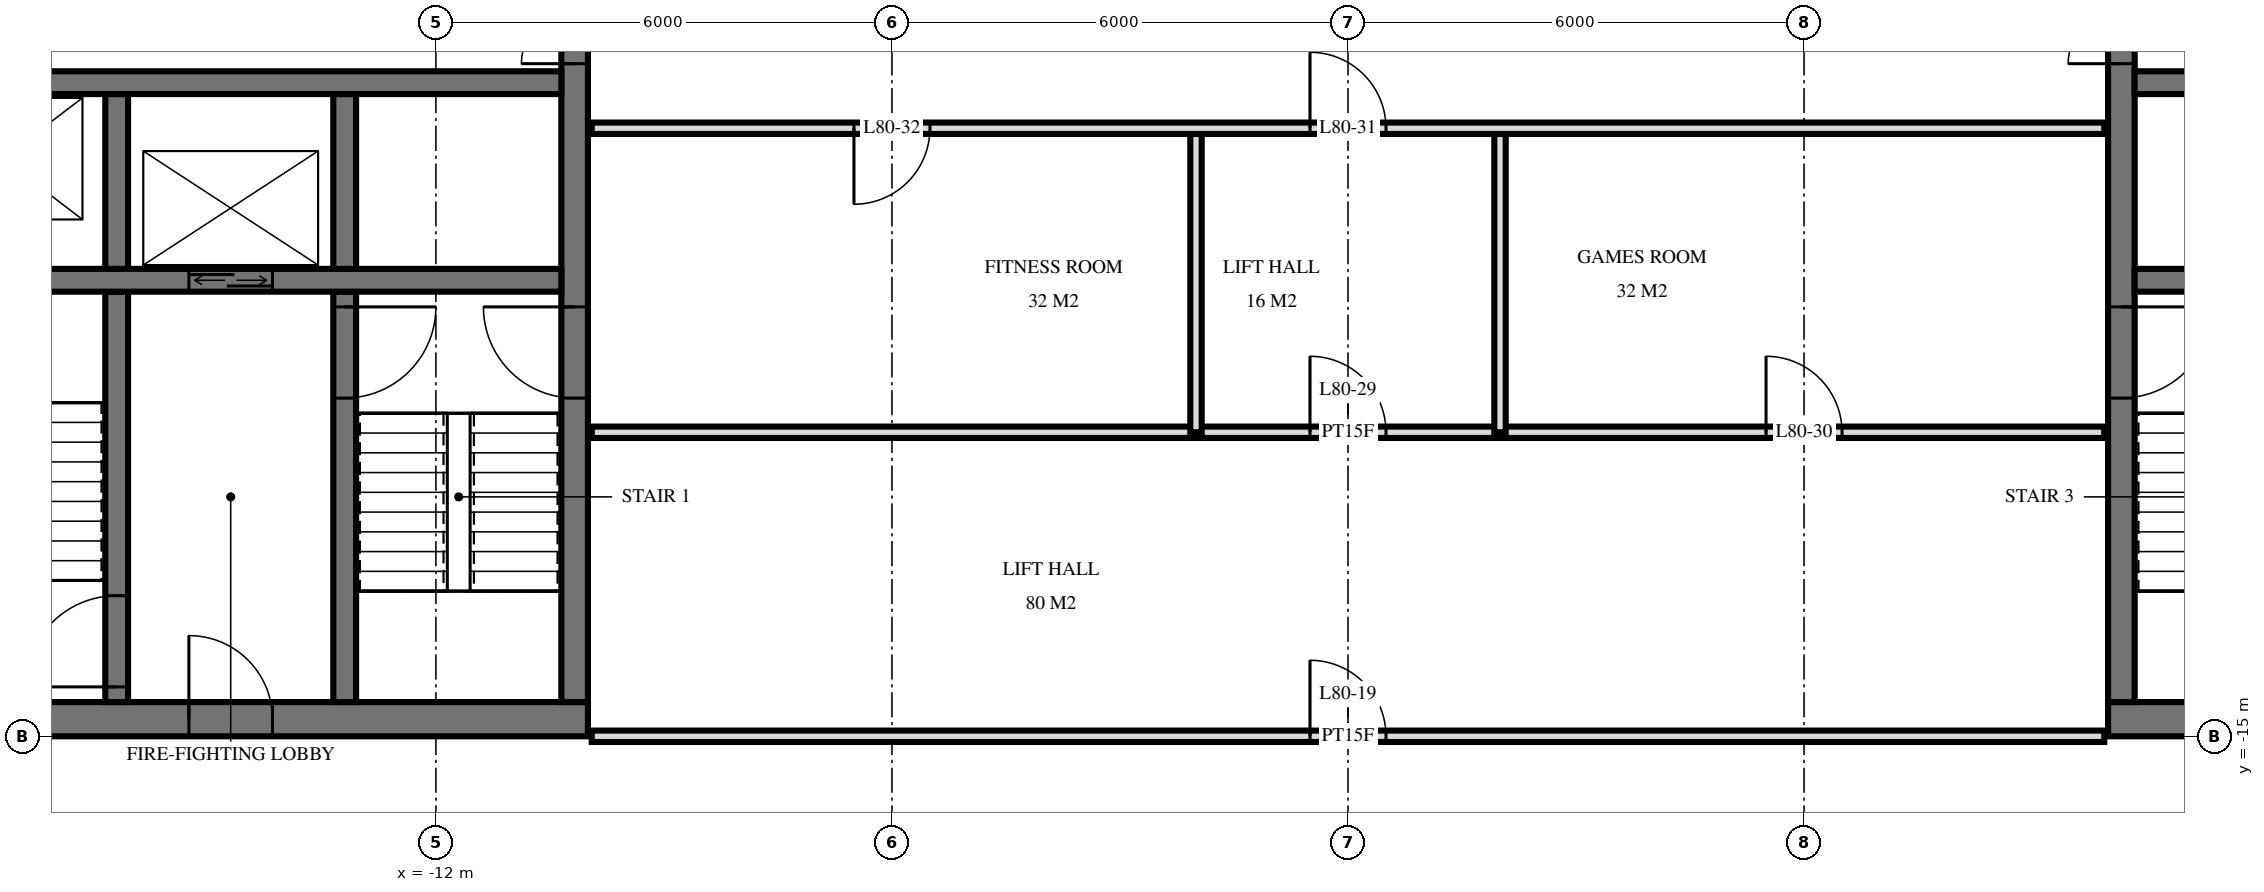
"""IFC4 building model, lengths in metres.
Left out: names, types, materials, properties, quantities, classifications, styles, units other than length and angle.
Written with IfcOpenShell. Run it as: python <this file> out.ifc"""

import sys

from ifc_helpers import new_model, si_unit, direction, frame, frame_2d, origin, place, context, subcontext, project, spatial, rectangle, extrude, element, fill, save


model = new_model("IFC4")
c1 = context("Model", 3, precision=1e-05, world=origin(), true_north=direction((0.0, 1.0)))
c2 = subcontext(c1, "Body", "Model", "MODEL_VIEW")
j1 = project(units=[si_unit("LENGTHUNIT", "METRE"), si_unit("PLANEANGLEUNIT", "RADIAN")], contexts=[c1])
p1 = place(None, origin())
s1 = spatial("IfcSite", under=j1, at=p1, CompositionType="ELEMENT")
p2 = place(p1, origin())
s2 = spatial("IfcBuilding", under=s1, at=p2, CompositionType="ELEMENT")
p3 = place(p2, frame((0.0, 0.0, 301.6)))
s3 = spatial("IfcBuildingStorey", under=s2, at=p3, CompositionType="ELEMENT", Elevation=301.6)
p4 = place(p3, frame((-19.5, -14.775, 0.0), z_axis=(0.0, 0.0, 1.0), x_axis=(1.0, 0.0, 0.0)))
e1 = element("IfcWall", 1, at=p4, inside=s3, PredefinedType="SHEAR", context=c2, shape_type="SweptSolid", body=[
    extrude(rectangle(XDim=9.5, YDim=0.45, at=frame_2d((4.75, 0.0))), origin(), (0.0, 0.0, 1.0), 3.5),
])
p5 = place(p4, frame((1.2, 0.0, 0.0)))
e2 = element("IfcOpeningElement", 2, at=p5, cuts=e1, PredefinedType="OPENING", context=c2, shape_type="SweptSolid", body=[
    extrude(rectangle(XDim=1.2, YDim=2.1, at=frame_2d((0.6, 1.05))), frame((0.0, 0.235, 0.0), z_axis=(0.0, -1.0, 0.0), x_axis=(1.0, 0.0, 0.0)), (0.0, 0.0, 1.0), 0.47),
])
p6 = place(p4, frame((4.25, 0.0, 0.0)))
e3 = element("IfcOpeningElement", 3, at=p6, cuts=e1, PredefinedType="OPENING", context=c2, shape_type="SweptSolid", body=[
    extrude(rectangle(XDim=1.1, YDim=2.1, at=frame_2d((0.55, 1.05))), frame((0.0, 0.235, 0.0), z_axis=(0.0, -1.0, 0.0), x_axis=(1.0, 0.0, 0.0)), (0.0, 0.0, 1.0), 0.47),
])
p7 = place(p3, frame((-10.175, -14.55, 0.0), z_axis=(0.0, 0.0, 1.0), x_axis=(0.0, 1.0, 0.0)))
e4 = element("IfcWall", 4, at=p7, inside=s3, PredefinedType="SHEAR", context=c2, shape_type="SweptSolid", body=[
    extrude(rectangle(XDim=14.1, YDim=0.35, at=frame_2d((7.05, 0.0))), origin(), (0.0, 0.0, 1.0), 3.5),
])
p8 = place(p7, frame((8.4, 0.0, 0.0)))
e5 = element("IfcOpeningElement", 5, at=p8, cuts=e4, PredefinedType="OPENING", context=c2, shape_type="SweptSolid", body=[
    extrude(rectangle(XDim=1.4, YDim=2.4, at=frame_2d((0.7, 1.2))), frame((0.0, 0.185, 0.0), z_axis=(0.0, -1.0, 0.0), x_axis=(1.0, 0.0, 0.0)), (0.0, 0.0, 1.0), 0.37),
])
p9 = place(p7, frame((10.0, 0.0, 0.0)))
e6 = element("IfcOpeningElement", 6, at=p9, cuts=e4, PredefinedType="OPENING", context=c2, shape_type="SweptSolid", body=[
    extrude(rectangle(XDim=1.4, YDim=2.4, at=frame_2d((0.7, 1.2))), frame((0.0, 0.185, 0.0), z_axis=(0.0, -1.0, 0.0), x_axis=(1.0, 0.0, 0.0)), (0.0, 0.0, 1.0), 0.37),
])
p10 = place(p7, frame((4.0, 0.0, 0.0)))
e7 = element("IfcOpeningElement", 7, at=p10, cuts=e4, PredefinedType="OPENING", context=c2, shape_type="SweptSolid", body=[
    extrude(rectangle(XDim=1.2, YDim=2.1, at=frame_2d((0.6, 1.05))), frame((0.0, 0.185, 0.0), z_axis=(0.0, -1.0, 0.0), x_axis=(1.0, 0.0, 0.0)), (0.0, 0.0, 1.0), 0.37),
])
p11 = place(p3, frame((-19.05, -6.4, 0.0), z_axis=(0.0, 0.0, 1.0), x_axis=(1.0, 0.0, 0.0)))
e8 = element("IfcWall", 8, at=p11, inside=s3, PredefinedType="SHEAR", context=c2, shape_type="SweptSolid", body=[
    extrude(rectangle(XDim=8.7, YDim=0.3, at=frame_2d((4.35, 0.0))), origin(), (0.0, 0.0, 1.0), 3.5),
])
p12 = place(p11, frame((0.8, 0.0, 0.0)))
e9 = element("IfcOpeningElement", 9, at=p12, cuts=e8, PredefinedType="OPENING", context=c2, shape_type="SweptSolid", body=[
    extrude(rectangle(XDim=1.1, YDim=2.1, at=frame_2d((0.55, 1.05))), frame((0.0, 0.16, 0.0), z_axis=(0.0, -1.0, 0.0), x_axis=(1.0, 0.0, 0.0)), (0.0, 0.0, 1.0), 0.32),
])
p13 = place(p3, frame((-19.05, -9.0, 0.0), z_axis=(0.0, 0.0, 1.0), x_axis=(1.0, 0.0, 0.0)))
e10 = element("IfcWall", 10, at=p13, inside=s3, PredefinedType="SHEAR", context=c2, shape_type="SweptSolid", body=[
    extrude(rectangle(XDim=8.7, YDim=0.3, at=frame_2d((4.35, 0.0))), origin(), (0.0, 0.0, 1.0), 3.5),
])
p14 = place(p13, frame((3.8, 0.0, 0.0)))
e11 = element("IfcOpeningElement", 11, at=p14, cuts=e10, PredefinedType="OPENING", context=c2, shape_type="SweptSolid", body=[
    extrude(rectangle(XDim=1.1, YDim=2.1, at=frame_2d((0.55, 1.05))), frame((0.0, 0.16, 0.0), z_axis=(0.0, -1.0, 0.0), x_axis=(1.0, 0.0, 0.0)), (0.0, 0.0, 1.0), 0.32),
])
p15 = place(p3, frame((-13.2, -8.85, 0.0), z_axis=(0.0, 0.0, 1.0), x_axis=(0.0, 1.0, 0.0)))
e12 = element("IfcWall", 12, at=p15, inside=s3, PredefinedType="SHEAR", context=c2, shape_type="SweptSolid", body=[
    extrude(rectangle(XDim=2.3, YDim=0.3, at=frame_2d((1.15, 0.0))), origin(), (0.0, 0.0, 1.0), 3.5),
])
p16 = place(p3, frame((-13.2, -14.55, 0.0), z_axis=(0.0, 0.0, 1.0), x_axis=(0.0, 1.0, 0.0)))
e13 = element("IfcWall", 13, at=p16, inside=s3, PredefinedType="SHEAR", context=c2, shape_type="SweptSolid", body=[
    extrude(rectangle(XDim=5.4, YDim=0.3, at=frame_2d((2.7, 0.0))), origin(), (0.0, 0.0, 1.0), 3.5),
])
p17 = place(p16, frame((4.0, 0.0, 0.0)))
e14 = element("IfcOpeningElement", 14, at=p17, cuts=e13, PredefinedType="OPENING", context=c2, shape_type="SweptSolid", body=[
    extrude(rectangle(XDim=1.2, YDim=2.1, at=frame_2d((0.6, 1.05))), frame((0.0, 0.16, 0.0), z_axis=(0.0, -1.0, 0.0), x_axis=(1.0, 0.0, 0.0)), (0.0, 0.0, 1.0), 0.32),
])
p18 = place(p3, frame((-16.2, -8.85, 0.0), z_axis=(0.0, 0.0, 1.0), x_axis=(0.0, 1.0, 0.0)))
e15 = element("IfcWall", 15, at=p18, inside=s3, PredefinedType="SHEAR", context=c2, shape_type="SweptSolid", body=[
    extrude(rectangle(XDim=2.3, YDim=0.3, at=frame_2d((1.15, 0.0))), origin(), (0.0, 0.0, 1.0), 3.5),
])
p19 = place(p3, frame((-16.2, -14.55, 0.0), z_axis=(0.0, 0.0, 1.0), x_axis=(0.0, 1.0, 0.0)))
e16 = element("IfcWall", 16, at=p19, inside=s3, PredefinedType="SHEAR", context=c2, shape_type="SweptSolid", body=[
    extrude(rectangle(XDim=5.4, YDim=0.3, at=frame_2d((2.7, 0.0))), origin(), (0.0, 0.0, 1.0), 3.5),
])
p20 = place(p19, frame((0.2, 0.0, 0.0)))
e17 = element("IfcOpeningElement", 17, at=p20, cuts=e16, PredefinedType="OPENING", context=c2, shape_type="SweptSolid", body=[
    extrude(rectangle(XDim=1.2, YDim=2.1, at=frame_2d((0.6, 1.05))), frame((0.0, 0.16, 0.0), z_axis=(0.0, -1.0, 0.0), x_axis=(1.0, 0.0, 0.0)), (0.0, 0.0, 1.0), 0.32),
])
p21 = place(p3, frame((10.0, -14.775, 0.0), z_axis=(0.0, 0.0, 1.0), x_axis=(1.0, 0.0, 0.0)))
e18 = element("IfcWall", 18, at=p21, inside=s3, PredefinedType="SHEAR", context=c2, shape_type="SweptSolid", body=[
    extrude(rectangle(XDim=9.5, YDim=0.45, at=frame_2d((4.75, 0.0))), origin(), (0.0, 0.0, 1.0), 3.5),
])
p22 = place(p21, frame((7.1, 0.0, 0.0)))
e19 = element("IfcOpeningElement", 19, at=p22, cuts=e18, PredefinedType="OPENING", context=c2, shape_type="SweptSolid", body=[
    extrude(rectangle(XDim=1.2, YDim=2.1, at=frame_2d((0.6, 1.05))), frame((0.0, 0.235, 0.0), z_axis=(0.0, -1.0, 0.0), x_axis=(1.0, 0.0, 0.0)), (0.0, 0.0, 1.0), 0.47),
])
p23 = place(p21, frame((4.15, 0.0, 0.0)))
e20 = element("IfcOpeningElement", 20, at=p23, cuts=e18, PredefinedType="OPENING", context=c2, shape_type="SweptSolid", body=[
    extrude(rectangle(XDim=1.1, YDim=2.1, at=frame_2d((0.55, 1.05))), frame((0.0, 0.235, 0.0), z_axis=(0.0, -1.0, 0.0), x_axis=(1.0, 0.0, 0.0)), (0.0, 0.0, 1.0), 0.47),
])
p24 = place(p3, frame((10.175, -14.55, 0.0), z_axis=(0.0, 0.0, 1.0), x_axis=(0.0, 1.0, 0.0)))
e21 = element("IfcWall", 21, at=p24, inside=s3, PredefinedType="SHEAR", context=c2, shape_type="SweptSolid", body=[
    extrude(rectangle(XDim=14.1, YDim=0.35, at=frame_2d((7.05, 0.0))), origin(), (0.0, 0.0, 1.0), 3.5),
])
p25 = place(p24, frame((8.4, 0.0, 0.0)))
e22 = element("IfcOpeningElement", 22, at=p25, cuts=e21, PredefinedType="OPENING", context=c2, shape_type="SweptSolid", body=[
    extrude(rectangle(XDim=1.4, YDim=2.4, at=frame_2d((0.7, 1.2))), frame((0.0, 0.185, 0.0), z_axis=(0.0, -1.0, 0.0), x_axis=(1.0, 0.0, 0.0)), (0.0, 0.0, 1.0), 0.37),
])
p26 = place(p24, frame((10.0, 0.0, 0.0)))
e23 = element("IfcOpeningElement", 23, at=p26, cuts=e21, PredefinedType="OPENING", context=c2, shape_type="SweptSolid", body=[
    extrude(rectangle(XDim=1.4, YDim=2.4, at=frame_2d((0.7, 1.2))), frame((0.0, 0.185, 0.0), z_axis=(0.0, -1.0, 0.0), x_axis=(1.0, 0.0, 0.0)), (0.0, 0.0, 1.0), 0.37),
])
p27 = place(p24, frame((4.0, 0.0, 0.0)))
e24 = element("IfcOpeningElement", 24, at=p27, cuts=e21, PredefinedType="OPENING", context=c2, shape_type="SweptSolid", body=[
    extrude(rectangle(XDim=1.2, YDim=2.1, at=frame_2d((0.6, 1.05))), frame((0.0, 0.185, 0.0), z_axis=(0.0, -1.0, 0.0), x_axis=(1.0, 0.0, 0.0)), (0.0, 0.0, 1.0), 0.37),
])
p28 = place(p3, frame((10.35, -6.4, 0.0), z_axis=(0.0, 0.0, 1.0), x_axis=(1.0, 0.0, 0.0)))
e25 = element("IfcWall", 25, at=p28, inside=s3, PredefinedType="SHEAR", context=c2, shape_type="SweptSolid", body=[
    extrude(rectangle(XDim=8.7, YDim=0.3, at=frame_2d((4.35, 0.0))), origin(), (0.0, 0.0, 1.0), 3.5),
])
p29 = place(p28, frame((6.8, 0.0, 0.0)))
e26 = element("IfcOpeningElement", 26, at=p29, cuts=e25, PredefinedType="OPENING", context=c2, shape_type="SweptSolid", body=[
    extrude(rectangle(XDim=1.1, YDim=2.1, at=frame_2d((0.55, 1.05))), frame((0.0, 0.16, 0.0), z_axis=(0.0, -1.0, 0.0), x_axis=(1.0, 0.0, 0.0)), (0.0, 0.0, 1.0), 0.32),
])
p30 = place(p3, frame((10.35, -9.0, 0.0), z_axis=(0.0, 0.0, 1.0), x_axis=(1.0, 0.0, 0.0)))
e27 = element("IfcWall", 27, at=p30, inside=s3, PredefinedType="SHEAR", context=c2, shape_type="SweptSolid", body=[
    extrude(rectangle(XDim=8.7, YDim=0.3, at=frame_2d((4.35, 0.0))), origin(), (0.0, 0.0, 1.0), 3.5),
])
p31 = place(p30, frame((3.8, 0.0, 0.0)))
e28 = element("IfcOpeningElement", 28, at=p31, cuts=e27, PredefinedType="OPENING", context=c2, shape_type="SweptSolid", body=[
    extrude(rectangle(XDim=1.1, YDim=2.1, at=frame_2d((0.55, 1.05))), frame((0.0, 0.16, 0.0), z_axis=(0.0, -1.0, 0.0), x_axis=(1.0, 0.0, 0.0)), (0.0, 0.0, 1.0), 0.32),
])
for number, where, z_axis, x_axis in (
    (29, (2.0, -11.0, 0.0), (0.0, 0.0, 1.0), (0.0, 1.0, 0.0)),
    (30, (-2.0, -11.0, 0.0), (0.0, 0.0, 1.0), (0.0, 1.0, 0.0)),
):
    element("IfcWall", number, at=place(p3, frame(where, z_axis=z_axis, x_axis=x_axis)), inside=s3, PredefinedType="PARTITIONING", context=c2, shape_type="SweptSolid", body=[
        extrude(rectangle(XDim=4.0, YDim=0.15, at=frame_2d((2.0, 0.0))), origin(), (0.0, 0.0, 1.0), 3.22),
    ])
p32 = place(p3, frame((-9.95, -15.0, 0.0), z_axis=(0.0, 0.0, 1.0), x_axis=(1.0, 0.0, 0.0)))
e31 = element("IfcWall", 31, at=p32, inside=s3, PredefinedType="PARTITIONING", context=c2, shape_type="SweptSolid", body=[
    extrude(rectangle(XDim=19.9, YDim=0.15, at=frame_2d((9.95, 0.0))), origin(), (0.0, 0.0, 1.0), 2.584),
])
p33 = place(p32, frame((9.45, 0.0, 0.0)))
e32 = element("IfcOpeningElement", 32, at=p33, cuts=e31, PredefinedType="OPENING", context=c2, shape_type="SweptSolid", body=[
    extrude(rectangle(XDim=1.0, YDim=2.1, at=frame_2d((0.5, 1.05))), frame((0.0, 0.085, 0.0), z_axis=(0.0, -1.0, 0.0), x_axis=(1.0, 0.0, 0.0)), (0.0, 0.0, 1.0), 0.17),
])
p34 = place(p3, frame((-9.95, -11.0, 0.0), z_axis=(0.0, 0.0, 1.0), x_axis=(1.0, 0.0, 0.0)))
e33 = element("IfcWall", 33, at=p34, inside=s3, PredefinedType="PARTITIONING", context=c2, shape_type="SweptSolid", body=[
    extrude(rectangle(XDim=19.9, YDim=0.15, at=frame_2d((9.95, 0.0))), origin(), (0.0, 0.0, 1.0), 3.22),
])
p35 = place(p34, frame((9.45, 0.0, 0.0)))
e34 = element("IfcOpeningElement", 34, at=p35, cuts=e33, PredefinedType="OPENING", context=c2, shape_type="SweptSolid", body=[
    extrude(rectangle(XDim=1.0, YDim=2.1, at=frame_2d((0.5, 1.05))), frame((0.0, 0.085, 0.0), z_axis=(0.0, -1.0, 0.0), x_axis=(1.0, 0.0, 0.0)), (0.0, 0.0, 1.0), 0.17),
])
p36 = place(p34, frame((15.45, 0.0, 0.0)))
e35 = element("IfcOpeningElement", 35, at=p36, cuts=e33, PredefinedType="OPENING", context=c2, shape_type="SweptSolid", body=[
    extrude(rectangle(XDim=1.0, YDim=2.1, at=frame_2d((0.5, 1.05))), frame((0.0, 0.085, 0.0), z_axis=(0.0, -1.0, 0.0), x_axis=(1.0, 0.0, 0.0)), (0.0, 0.0, 1.0), 0.17),
])
p37 = place(p3, frame((-9.95, -7.0, 0.0), z_axis=(0.0, 0.0, 1.0), x_axis=(1.0, 0.0, 0.0)))
e36 = element("IfcWall", 36, at=p37, inside=s3, PredefinedType="PARTITIONING", context=c2, shape_type="SweptSolid", body=[
    extrude(rectangle(XDim=19.9, YDim=0.15, at=frame_2d((9.95, 0.0))), origin(), (0.0, 0.0, 1.0), 3.22),
])
p38 = place(p37, frame((9.45, 0.0, 0.0)))
e37 = element("IfcOpeningElement", 37, at=p38, cuts=e36, PredefinedType="OPENING", context=c2, shape_type="SweptSolid", body=[
    extrude(rectangle(XDim=1.0, YDim=2.1, at=frame_2d((0.5, 1.05))), frame((0.0, 0.085, 0.0), z_axis=(0.0, -1.0, 0.0), x_axis=(1.0, 0.0, 0.0)), (0.0, 0.0, 1.0), 0.17),
])
p39 = place(p37, frame((3.45, 0.0, 0.0)))
e38 = element("IfcOpeningElement", 38, at=p39, cuts=e36, PredefinedType="OPENING", context=c2, shape_type="SweptSolid", body=[
    extrude(rectangle(XDim=1.0, YDim=2.1, at=frame_2d((0.5, 1.05))), frame((0.0, 0.085, 0.0), z_axis=(0.0, -1.0, 0.0), x_axis=(1.0, 0.0, 0.0)), (0.0, 0.0, 1.0), 0.17),
])
p40 = place(p14, origin())
e39 = element("IfcDoor", 39, at=p40, inside=s3, OperationType="DOUBLE_DOOR_SLIDING", PredefinedType="USERDEFINED", context=c2, shape_type="SweptSolid", body=[
    extrude(rectangle(XDim=1.1, YDim=2.1, at=frame_2d((0.55, 1.05))), frame((0.0, 0.025, 0.0), z_axis=(0.0, -1.0, 0.0), x_axis=(1.0, 0.0, 0.0)), (0.0, 0.0, 1.0), 0.05),
])
fill(e11, e39)
p41 = place(p8, origin())
e40 = element("IfcDoor", 40, at=p41, inside=s3, OperationType="DOUBLE_DOOR_SINGLE_SWING", PredefinedType="DOOR", context=c2, shape_type="SweptSolid", body=[
    extrude(rectangle(XDim=1.4, YDim=2.4, at=frame_2d((0.7, 1.2))), frame((0.0, 0.025, 0.0), z_axis=(0.0, -1.0, 0.0), x_axis=(1.0, 0.0, 0.0)), (0.0, 0.0, 1.0), 0.05),
])
fill(e5, e40)
p42 = place(p10, origin())
e41 = element("IfcDoor", 41, at=p42, inside=s3, OperationType="SINGLE_SWING_LEFT", PredefinedType="DOOR", context=c2, shape_type="SweptSolid", body=[
    extrude(rectangle(XDim=1.2, YDim=2.1, at=frame_2d((0.6, 1.05))), frame((0.0, 0.025, 0.0), z_axis=(0.0, -1.0, 0.0), x_axis=(1.0, 0.0, 0.0)), (0.0, 0.0, 1.0), 0.05),
])
fill(e7, e41)
p43 = place(p6, origin())
e42 = element("IfcDoor", 42, at=p43, inside=s3, OperationType="SINGLE_SWING_RIGHT", PredefinedType="DOOR", context=c2, shape_type="SweptSolid", body=[
    extrude(rectangle(XDim=1.1, YDim=2.1, at=frame_2d((0.55, 1.05))), frame((0.0, 0.025, 0.0), z_axis=(0.0, -1.0, 0.0), x_axis=(1.0, 0.0, 0.0)), (0.0, 0.0, 1.0), 0.05),
])
fill(e3, e42)
p44 = place(p17, frame((0.6, 0.0, 0.0), z_axis=(0.0, 0.0, 1.0), x_axis=(-1.0, 0.0, 0.0)))
e43 = element("IfcDoor", 43, at=p44, inside=s3, OperationType="SINGLE_SWING_RIGHT", PredefinedType="DOOR", context=c2, shape_type="SweptSolid", body=[
    extrude(rectangle(XDim=1.2, YDim=2.1, at=frame_2d((0.0, 1.05))), frame((0.0, -0.025, 0.0), z_axis=(0.0, 1.0, 0.0), x_axis=(-1.0, 0.0, 0.0)), (0.0, 0.0, 1.0), 0.05),
])
fill(e14, e43)
p45 = place(p20, origin())
e44 = element("IfcDoor", 44, at=p45, inside=s3, OperationType="SINGLE_SWING_RIGHT", PredefinedType="DOOR", context=c2, shape_type="SweptSolid", body=[
    extrude(rectangle(XDim=1.2, YDim=2.1, at=frame_2d((0.6, 1.05))), frame((0.0, 0.025, 0.0), z_axis=(0.0, -1.0, 0.0), x_axis=(1.0, 0.0, 0.0)), (0.0, 0.0, 1.0), 0.05),
])
fill(e17, e44)
p46 = place(p25, origin())
e45 = element("IfcDoor", 45, at=p46, inside=s3, OperationType="DOUBLE_DOOR_SINGLE_SWING", PredefinedType="DOOR", context=c2, shape_type="SweptSolid", body=[
    extrude(rectangle(XDim=1.4, YDim=2.4, at=frame_2d((0.7, 1.2))), frame((0.0, 0.025, 0.0), z_axis=(0.0, -1.0, 0.0), x_axis=(1.0, 0.0, 0.0)), (0.0, 0.0, 1.0), 0.05),
])
fill(e22, e45)
p47 = place(p27, frame((0.6, 0.0, 0.0), z_axis=(0.0, 0.0, 1.0), x_axis=(-1.0, 0.0, 0.0)))
e46 = element("IfcDoor", 46, at=p47, inside=s3, OperationType="SINGLE_SWING_RIGHT", PredefinedType="DOOR", context=c2, shape_type="SweptSolid", body=[
    extrude(rectangle(XDim=1.2, YDim=2.1, at=frame_2d((0.0, 1.05))), frame((0.0, -0.025, 0.0), z_axis=(0.0, 1.0, 0.0), x_axis=(-1.0, 0.0, 0.0)), (0.0, 0.0, 1.0), 0.05),
])
fill(e24, e46)
p48 = place(p33, origin())
e47 = element("IfcDoor", 47, at=p48, inside=s3, OperationType="SINGLE_SWING_RIGHT", PredefinedType="DOOR", context=c2, shape_type="SweptSolid", body=[
    extrude(rectangle(XDim=1.0, YDim=2.1, at=frame_2d((0.5, 1.05))), frame((0.0, 0.025, 0.0), z_axis=(0.0, -1.0, 0.0), x_axis=(1.0, 0.0, 0.0)), (0.0, 0.0, 1.0), 0.05),
])
fill(e32, e47)
p49 = place(p35, origin())
e48 = element("IfcDoor", 48, at=p49, inside=s3, OperationType="SINGLE_SWING_RIGHT", PredefinedType="DOOR", context=c2, shape_type="SweptSolid", body=[
    extrude(rectangle(XDim=1.0, YDim=2.1, at=frame_2d((0.5, 1.05))), frame((0.0, 0.025, 0.0), z_axis=(0.0, -1.0, 0.0), x_axis=(1.0, 0.0, 0.0)), (0.0, 0.0, 1.0), 0.05),
])
fill(e34, e48)
p50 = place(p36, origin())
e49 = element("IfcDoor", 49, at=p50, inside=s3, OperationType="SINGLE_SWING_RIGHT", PredefinedType="DOOR", context=c2, shape_type="SweptSolid", body=[
    extrude(rectangle(XDim=1.0, YDim=2.1, at=frame_2d((0.5, 1.05))), frame((0.0, 0.025, 0.0), z_axis=(0.0, -1.0, 0.0), x_axis=(1.0, 0.0, 0.0)), (0.0, 0.0, 1.0), 0.05),
])
fill(e35, e49)
p51 = place(p38, origin())
e50 = element("IfcDoor", 50, at=p51, inside=s3, OperationType="SINGLE_SWING_RIGHT", PredefinedType="DOOR", context=c2, shape_type="SweptSolid", body=[
    extrude(rectangle(XDim=1.0, YDim=2.1, at=frame_2d((0.5, 1.05))), frame((0.0, 0.025, 0.0), z_axis=(0.0, -1.0, 0.0), x_axis=(1.0, 0.0, 0.0)), (0.0, 0.0, 1.0), 0.05),
])
fill(e37, e50)
p52 = place(p39, frame((0.5, 0.0, 0.0), z_axis=(0.0, 0.0, 1.0), x_axis=(-1.0, 0.0, 0.0)))
e51 = element("IfcDoor", 51, at=p52, inside=s3, OperationType="SINGLE_SWING_LEFT", PredefinedType="DOOR", context=c2, shape_type="SweptSolid", body=[
    extrude(rectangle(XDim=1.0, YDim=2.1, at=frame_2d((0.0, 1.05))), frame((0.0, -0.025, 0.0), z_axis=(0.0, 1.0, 0.0), x_axis=(-1.0, 0.0, 0.0)), (0.0, 0.0, 1.0), 0.05),
])
fill(e38, e51)
save(model, sys.argv[1])
